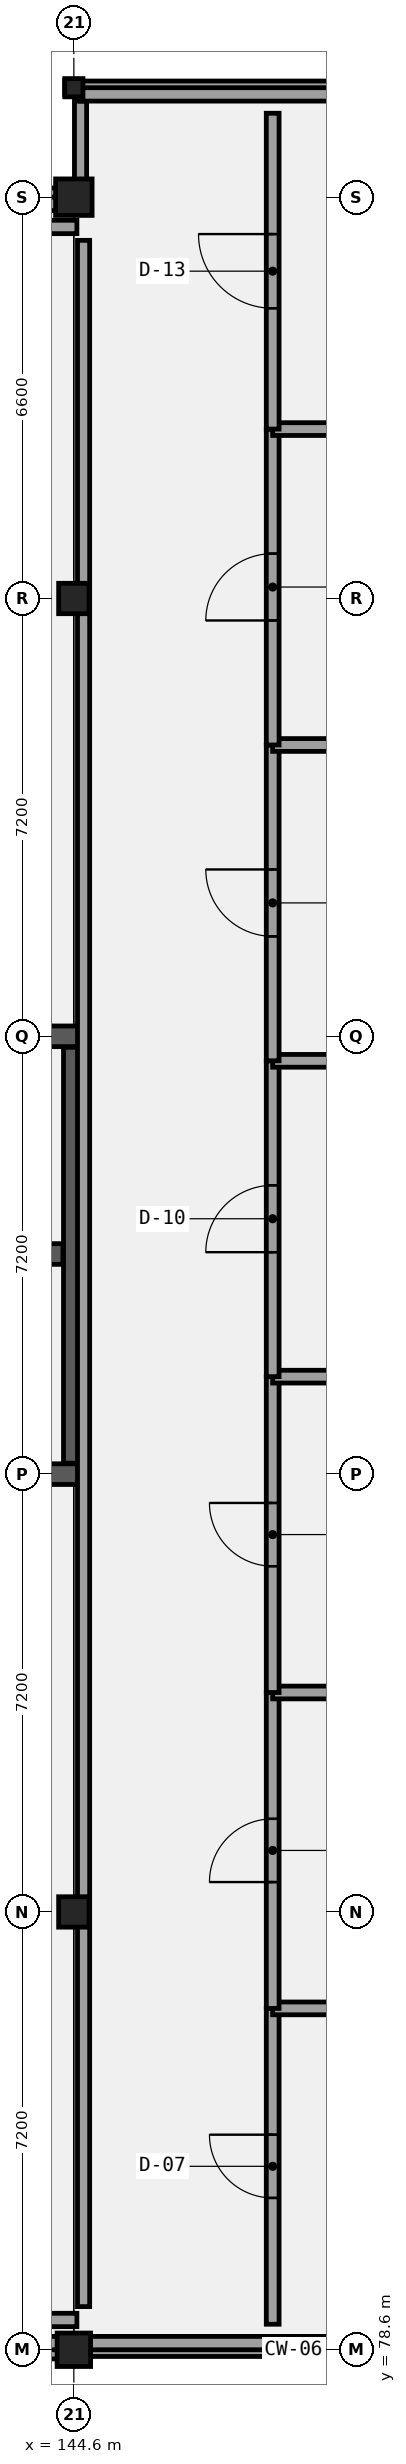
"""IFC4 building model, lengths in metres.
Left out: names, types, materials, properties, quantities, classifications, styles, units other than length and angle.
Written with IfcOpenShell. Run it as: python <this file> out.ifc"""

import sys

from ifc_helpers import new_model, si_unit, direction, frame, frame_2d, origin, origin_2d, place, context, subcontext, project, spatial, rectangle, i_section, extrude, element, fill, save


model = new_model("IFC4")
c1 = context("Model", 3, precision=1e-05, world=origin(), true_north=direction((0.0, 1.0)))
c2 = subcontext(c1, "Body", "Model", "MODEL_VIEW")
j1 = project(units=[si_unit("LENGTHUNIT", "METRE"), si_unit("PLANEANGLEUNIT", "RADIAN")], contexts=[c1])
p1 = place(None, origin())
s1 = spatial("IfcSite", under=j1, at=p1, CompositionType="ELEMENT")
p2 = place(p1, origin())
s2 = spatial("IfcBuilding", under=s1, at=p2, CompositionType="ELEMENT")
p3 = place(p2, frame((0.0, 0.0, 30.9)))
s3 = spatial("IfcBuildingStorey", under=s2, at=p3, CompositionType="ELEMENT", Elevation=30.9)
p4 = place(p3, frame((130.03, 100.2, 0.0), z_axis=(0.0, 0.0, 1.0), x_axis=(1.0, 0.0, 0.0)))
e1 = element("IfcWall", 1, at=p4, inside=s3, PredefinedType="SHEAR", context=c2, shape_type="SweptSolid", body=[
    extrude(rectangle(XDim=14.74, YDim=0.34, at=frame_2d((7.37, 0.0))), origin(), (0.0, 0.0, 1.0), 4.5),
])
p5 = place(p3, frame((130.03, 93.0, 0.0), z_axis=(0.0, 0.0, 1.0), x_axis=(1.0, 0.0, 0.0)))
e2 = element("IfcWall", 2, at=p5, inside=s3, PredefinedType="SHEAR", context=c2, shape_type="SweptSolid", body=[
    extrude(rectangle(XDim=14.74, YDim=0.34, at=frame_2d((7.37, 0.0))), origin(), (0.0, 0.0, 1.0), 4.5),
])
p6 = place(p5, frame((3.72, 0.0, 0.0)))
e3 = element("IfcOpeningElement", 3, at=p6, cuts=e2, PredefinedType="OPENING", context=c2, shape_type="SweptSolid", body=[
    extrude(rectangle(XDim=1.3, YDim=2.2, at=frame_2d((0.65, 1.1))), frame((0.0, 0.18, 0.0), z_axis=(0.0, -1.0, 0.0), x_axis=(1.0, 0.0, 0.0)), (0.0, 0.0, 1.0), 0.36),
])
p7 = place(p5, frame((11.72, 0.0, 0.0)))
e4 = element("IfcOpeningElement", 4, at=p7, cuts=e2, PredefinedType="OPENING", context=c2, shape_type="SweptSolid", body=[
    extrude(rectangle(XDim=1.3, YDim=2.2, at=frame_2d((0.65, 1.1))), frame((0.0, 0.18, 0.0), z_axis=(0.0, -1.0, 0.0), x_axis=(1.0, 0.0, 0.0)), (0.0, 0.0, 1.0), 0.36),
])
p8 = place(p3, frame((144.6, 93.18, 0.0), z_axis=(0.0, 0.0, 1.0), x_axis=(0.0, 1.0, 0.0)))
e5 = element("IfcWall", 5, at=p8, inside=s3, PredefinedType="SHEAR", context=c2, shape_type="SweptSolid", body=[
    extrude(rectangle(XDim=6.84, YDim=0.34, at=frame_2d((3.42, 0.0))), origin(), (0.0, 0.0, 1.0), 4.5),
])
p9 = place(p3, frame((130.38, 96.62, 0.0), z_axis=(0.0, 0.0, 1.0), x_axis=(1.0, 0.0, 0.0)))
e6 = element("IfcWall", 6, at=p9, inside=s3, PredefinedType="SHEAR", context=c2, shape_type="SweptSolid", body=[
    extrude(rectangle(XDim=14.04, YDim=0.34, at=frame_2d((7.02, 0.0))), origin(), (0.0, 0.0, 1.0), 4.5),
])
p10 = place(p9, frame((8.21, 0.0, 0.0)))
e7 = element("IfcOpeningElement", 7, at=p10, cuts=e6, PredefinedType="OPENING", context=c2, shape_type="SweptSolid", body=[
    extrude(rectangle(XDim=1.1, YDim=2.15, at=frame_2d((0.55, 1.075))), frame((0.0, 0.18, 0.0), z_axis=(0.0, -1.0, 0.0), x_axis=(1.0, 0.0, 0.0)), (0.0, 0.0, 1.0), 0.36),
])
p11 = place(p9, frame((10.13, 0.0, 0.0)))
e8 = element("IfcOpeningElement", 8, at=p11, cuts=e6, PredefinedType="OPENING", context=c2, shape_type="SweptSolid", body=[
    extrude(rectangle(XDim=1.1, YDim=2.15, at=frame_2d((0.55, 1.075))), frame((0.0, 0.18, 0.0), z_axis=(0.0, -1.0, 0.0), x_axis=(1.0, 0.0, 0.0)), (0.0, 0.0, 1.0), 0.36),
])
p12 = place(p9, frame((12.05, 0.0, 0.0)))
e9 = element("IfcOpeningElement", 9, at=p12, cuts=e6, PredefinedType="OPENING", context=c2, shape_type="SweptSolid", body=[
    extrude(rectangle(XDim=1.1, YDim=2.15, at=frame_2d((0.55, 1.075))), frame((0.0, 0.18, 0.0), z_axis=(0.0, -1.0, 0.0), x_axis=(1.0, 0.0, 0.0)), (0.0, 0.0, 1.0), 0.36),
])
p13 = place(p9, frame((0.395, 0.0, 0.0)))
e10 = element("IfcOpeningElement", 10, at=p13, cuts=e6, PredefinedType="OPENING", context=c2, shape_type="SweptSolid", body=[
    extrude(rectangle(XDim=1.15, YDim=2.15, at=frame_2d((0.575, 1.075))), frame((0.0, 0.18, 0.0), z_axis=(0.0, -1.0, 0.0), x_axis=(1.0, 0.0, 0.0)), (0.0, 0.0, 1.0), 0.36),
])
p14 = place(p3, frame((144.6, 78.6, 0.0), z_axis=(0.0, 0.0, 1.0), x_axis=(1.0, 0.0, 0.0)))
e11 = element("IfcColumn", 11, at=p14, inside=s3, PredefinedType="COLUMN", context=c2, shape_type="SweptSolid", body=[
    extrude(rectangle(XDim=0.55, YDim=0.55, at=origin_2d()), origin(), (0.0, 0.0, 1.0), 4.5),
])
for number, where, z_axis, x_axis in (
    (12, (144.6, 85.8, 0.0), (0.0, 0.0, 1.0), (1.0, 0.0, 0.0)),
    (13, (144.6, 107.4, 0.0), (0.0, 0.0, 1.0), (1.0, 0.0, 0.0)),
):
    element("IfcColumn", number, at=place(p3, frame(where, z_axis=z_axis, x_axis=x_axis)), inside=s3, PredefinedType="COLUMN", context=c2, shape_type="SweptSolid", body=[
        extrude(rectangle(XDim=0.5, YDim=0.5, at=origin_2d()), origin(), (0.0, 0.0, 1.0), 4.5),
    ])
p15 = place(p3, frame((144.6, 114.0, 0.0), z_axis=(0.0, 0.0, 1.0), x_axis=(1.0, 0.0, 0.0)))
e14 = element("IfcColumn", 14, at=p15, inside=s3, PredefinedType="COLUMN", context=c2, shape_type="SweptSolid", body=[
    extrude(rectangle(XDim=0.6, YDim=0.6, at=origin_2d()), origin(), (0.0, 0.0, 1.0), 4.5),
])
p16 = place(p3, frame((144.6, 115.8, 0.0), z_axis=(0.0, 0.0, 1.0), x_axis=(1.0, 0.0, 0.0)))
e15 = element("IfcColumn", 15, at=p16, inside=s3, PredefinedType="COLUMN", context=c2, shape_type="SweptSolid", body=[
    extrude(i_section(OverallWidth=0.3, OverallDepth=0.3, WebThickness=0.011, FlangeThickness=0.019, FilletRadius=0.027, at=origin_2d()), origin(), (0.0, 0.0, 1.0), 4.5),
])
p17 = place(p3, frame((108.45, 78.6, 0.0), z_axis=(0.0, 0.0, 1.0), x_axis=(1.0, 0.0, 0.0)))
e16 = element("IfcWall", 16, at=p17, inside=s3, PredefinedType="SOLIDWALL", context=c2, shape_type="SweptSolid", body=[
    extrude(rectangle(XDim=36.3, YDim=0.3, at=frame_2d((18.15, 0.0))), origin(), (0.0, 0.0, 1.0), 3.25),
])
p18 = place(p17, frame((17.6, 0.0, 0.0)))
e17 = element("IfcOpeningElement", 17, at=p18, cuts=e16, PredefinedType="OPENING", context=c2, shape_type="SweptSolid", body=[
    extrude(rectangle(XDim=1.1, YDim=2.2, at=frame_2d((0.55, 1.1))), frame((0.0, 0.16, 0.0), z_axis=(0.0, -1.0, 0.0), x_axis=(1.0, 0.0, 0.0)), (0.0, 0.0, 1.0), 0.32),
])
p19 = place(p17, frame((2.275, 0.0, 0.95)))
e18 = element("IfcOpeningElement", 18, at=p19, cuts=e16, PredefinedType="OPENING", context=c2, shape_type="SweptSolid", body=[
    extrude(rectangle(XDim=2.95, YDim=1.9, at=frame_2d((1.475, 0.95))), frame((0.0, 0.16, 0.0), z_axis=(0.0, -1.0, 0.0), x_axis=(1.0, 0.0, 0.0)), (0.0, 0.0, 1.0), 0.32),
])
p20 = place(p17, frame((10.525, 0.0, 0.95)))
e19 = element("IfcOpeningElement", 19, at=p20, cuts=e16, PredefinedType="OPENING", context=c2, shape_type="SweptSolid", body=[
    extrude(rectangle(XDim=0.85, YDim=1.4, at=frame_2d((0.425, 0.7))), frame((0.0, 0.16, 0.0), z_axis=(0.0, -1.0, 0.0), x_axis=(1.0, 0.0, 0.0)), (0.0, 0.0, 1.0), 0.32),
])
p21 = place(p17, frame((24.925, 0.0, 0.95)))
e20 = element("IfcOpeningElement", 20, at=p21, cuts=e16, PredefinedType="OPENING", context=c2, shape_type="SweptSolid", body=[
    extrude(rectangle(XDim=0.85, YDim=1.9, at=frame_2d((0.425, 0.95))), frame((0.0, 0.16, 0.0), z_axis=(0.0, -1.0, 0.0), x_axis=(1.0, 0.0, 0.0)), (0.0, 0.0, 1.0), 0.32),
])
p22 = place(p17, frame((32.05, 0.0, 0.95)))
e21 = element("IfcOpeningElement", 21, at=p22, cuts=e16, PredefinedType="OPENING", context=c2, shape_type="SweptSolid", body=[
    extrude(rectangle(XDim=1.0, YDim=1.4, at=frame_2d((0.5, 0.7))), frame((0.0, 0.16, 0.0), z_axis=(0.0, -1.0, 0.0), x_axis=(1.0, 0.0, 0.0)), (0.0, 0.0, 1.0), 0.32),
])
for number, where, z_axis, x_axis in (
    (22, (144.45, 78.6, 0.0), (0.0, 0.0, 1.0), (1.0, 0.0, 0.0)),
    (23, (168.15, 115.8, 0.0), (0.0, 0.0, 1.0), (-1.0, 0.0, 0.0)),
):
    element("IfcWall", number, at=place(p3, frame(where, z_axis=z_axis, x_axis=x_axis)), inside=s3, PredefinedType="PARAPET", context=c2, shape_type="SweptSolid", body=[
        extrude(rectangle(XDim=23.7, YDim=0.22, at=frame_2d((11.85, 0.0))), origin(), (0.0, 0.0, 1.0), 0.45),
    ])
p23 = place(p3, frame((144.75, 114.0, 0.0), z_axis=(0.0, 0.0, 1.0), x_axis=(-1.0, 0.0, 0.0)))
e24 = element("IfcWall", 24, at=p23, inside=s3, PredefinedType="SOLIDWALL", context=c2, shape_type="SweptSolid", body=[
    extrude(rectangle(XDim=36.3, YDim=0.3, at=frame_2d((18.15, 0.0))), origin(), (0.0, 0.0, 1.0), 3.5),
])
p24 = place(p23, frame((31.45, 0.0, 0.95)))
e25 = element("IfcOpeningElement", 25, at=p24, cuts=e24, PredefinedType="OPENING", context=c2, shape_type="SweptSolid", body=[
    extrude(rectangle(XDim=2.2, YDim=2.15, at=frame_2d((1.1, 1.075))), frame((0.0, 0.16, 0.0), z_axis=(0.0, -1.0, 0.0), x_axis=(1.0, 0.0, 0.0)), (0.0, 0.0, 1.0), 0.32),
])
p25 = place(p23, frame((24.125, 0.0, 0.95)))
e26 = element("IfcOpeningElement", 26, at=p25, cuts=e24, PredefinedType="OPENING", context=c2, shape_type="SweptSolid", body=[
    extrude(rectangle(XDim=2.45, YDim=1.4, at=frame_2d((1.225, 0.7))), frame((0.0, 0.16, 0.0), z_axis=(0.0, -1.0, 0.0), x_axis=(1.0, 0.0, 0.0)), (0.0, 0.0, 1.0), 0.32),
])
p26 = place(p23, frame((16.925, 0.0, 0.95)))
e27 = element("IfcOpeningElement", 27, at=p26, cuts=e24, PredefinedType="OPENING", context=c2, shape_type="SweptSolid", body=[
    extrude(rectangle(XDim=2.45, YDim=1.65, at=frame_2d((1.225, 0.825))), frame((0.0, 0.16, 0.0), z_axis=(0.0, -1.0, 0.0), x_axis=(1.0, 0.0, 0.0)), (0.0, 0.0, 1.0), 0.32),
])
p27 = place(p23, frame((9.725, 0.0, 0.95)))
e28 = element("IfcOpeningElement", 28, at=p27, cuts=e24, PredefinedType="OPENING", context=c2, shape_type="SweptSolid", body=[
    extrude(rectangle(XDim=2.45, YDim=1.9, at=frame_2d((1.225, 0.95))), frame((0.0, 0.16, 0.0), z_axis=(0.0, -1.0, 0.0), x_axis=(1.0, 0.0, 0.0)), (0.0, 0.0, 1.0), 0.32),
])
p28 = place(p23, frame((2.525, 0.0, 0.95)))
e29 = element("IfcOpeningElement", 29, at=p28, cuts=e24, PredefinedType="OPENING", context=c2, shape_type="SweptSolid", body=[
    extrude(rectangle(XDim=2.45, YDim=2.15, at=frame_2d((1.225, 1.075))), frame((0.0, 0.16, 0.0), z_axis=(0.0, -1.0, 0.0), x_axis=(1.0, 0.0, 0.0)), (0.0, 0.0, 1.0), 0.32),
])
p29 = place(p3, frame((108.71, 79.09, 4.5), z_axis=(0.0, 0.0, 1.0), x_axis=(1.0, 0.0, 0.0)))
e30 = element("IfcWall", 30, at=p29, inside=s3, PredefinedType="PARAPET", context=c2, shape_type="SweptSolid", body=[
    extrude(rectangle(XDim=35.94, YDim=0.22, at=frame_2d((17.97, 0.0))), origin(), (0.0, 0.0, 1.0), 1.12),
])
p30 = place(p3, frame((144.76, 79.31, 4.5), z_axis=(0.0, 0.0, 1.0), x_axis=(0.0, 1.0, 0.0)))
e31 = element("IfcWall", 31, at=p30, inside=s3, PredefinedType="PARAPET", context=c2, shape_type="SweptSolid", body=[
    extrude(rectangle(XDim=33.98, YDim=0.2, at=frame_2d((16.99, 0.0))), origin(), (0.0, 0.0, 1.0), 1.12),
])
p31 = place(p3, frame((144.65, 113.51, 4.5), z_axis=(0.0, 0.0, 1.0), x_axis=(-1.0, 0.0, 0.0)))
e32 = element("IfcWall", 32, at=p31, inside=s3, PredefinedType="PARAPET", context=c2, shape_type="SweptSolid", body=[
    extrude(rectangle(XDim=35.94, YDim=0.22, at=frame_2d((17.97, 0.0))), origin(), (0.0, 0.0, 1.0), 1.12),
])
p32 = place(p3, frame((108.71, 113.89, 4.5), z_axis=(0.0, 0.0, 1.0), x_axis=(1.0, 0.0, 0.0)))
e33 = element("IfcWall", 33, at=p32, inside=s3, PredefinedType="PARAPET", context=c2, shape_type="SweptSolid", body=[
    extrude(rectangle(XDim=35.89, YDim=0.22, at=frame_2d((17.945, 0.0))), origin(), (0.0, 0.0, 1.0), 1.12),
])
p33 = place(p3, frame((144.71, 114.11, 4.5), z_axis=(0.0, 0.0, 1.0), x_axis=(0.0, 1.0, 0.0)))
e34 = element("IfcWall", 34, at=p33, inside=s3, PredefinedType="PARAPET", context=c2, shape_type="SweptSolid", body=[
    extrude(rectangle(XDim=1.47, YDim=0.2, at=frame_2d((0.735, 0.0))), origin(), (0.0, 0.0, 1.0), 1.12),
])
p34 = place(p3, frame((144.71, 115.69, 4.5), z_axis=(0.0, 0.0, 1.0), x_axis=(1.0, 0.0, 0.0)))
e35 = element("IfcWall", 35, at=p34, inside=s3, PredefinedType="PARAPET", context=c2, shape_type="SweptSolid", body=[
    extrude(rectangle(XDim=23.18, YDim=0.22, at=frame_2d((11.59, 0.0))), origin(), (0.0, 0.0, 1.0), 1.12),
])
p35 = place(p3, frame((167.89, 78.71, 4.5), z_axis=(0.0, 0.0, 1.0), x_axis=(-1.0, 0.0, 0.0)))
e36 = element("IfcWall", 36, at=p35, inside=s3, PredefinedType="PARAPET", context=c2, shape_type="SweptSolid", body=[
    extrude(rectangle(XDim=59.18, YDim=0.22, at=frame_2d((29.59, 0.0))), origin(), (0.0, 0.0, 1.0), 1.12),
])
p36 = place(p3, frame((147.87, 79.02, 0.0), z_axis=(0.0, 0.0, 1.0), x_axis=(0.0, 1.0, 0.0)))
e37 = element("IfcWall", 37, at=p36, inside=s3, PredefinedType="PARTITIONING", context=c2, shape_type="SweptSolid", body=[
    extrude(rectangle(XDim=5.194, YDim=0.21, at=frame_2d((2.597, 0.0))), origin(), (0.0, 0.0, 1.0), 4.25),
])
p37 = place(p36, frame((2.077, 0.0, 0.0)))
e38 = element("IfcOpeningElement", 38, at=p37, cuts=e37, PredefinedType="OPENING", context=c2, shape_type="SweptSolid", body=[
    extrude(rectangle(XDim=1.04, YDim=2.1, at=frame_2d((0.52, 1.05))), frame((0.0, 0.115, 0.0), z_axis=(0.0, -1.0, 0.0), x_axis=(1.0, 0.0, 0.0)), (0.0, 0.0, 1.0), 0.23),
])
p38 = place(p3, frame((147.87, 84.214, 0.0), z_axis=(0.0, 0.0, 1.0), x_axis=(1.0, 0.0, 0.0)))
e39 = element("IfcWall", 39, at=p38, inside=s3, PredefinedType="PARTITIONING", context=c2, shape_type="SweptSolid", body=[
    extrude(rectangle(XDim=3.38, YDim=0.21, at=frame_2d((1.69, 0.0))), origin(), (0.0, 0.0, 1.0), 4.25),
])
p39 = place(p3, frame((147.87, 84.214, 0.0), z_axis=(0.0, 0.0, 1.0), x_axis=(0.0, 1.0, 0.0)))
e40 = element("IfcWall", 40, at=p39, inside=s3, PredefinedType="PARTITIONING", context=c2, shape_type="SweptSolid", body=[
    extrude(rectangle(XDim=5.195, YDim=0.21, at=frame_2d((2.597, 0.0))), origin(), (0.0, 0.0, 1.0), 4.25),
])
p40 = place(p39, frame((2.077, 0.0, 0.0)))
e41 = element("IfcOpeningElement", 41, at=p40, cuts=e40, PredefinedType="OPENING", context=c2, shape_type="SweptSolid", body=[
    extrude(rectangle(XDim=1.04, YDim=2.22, at=frame_2d((0.52, 1.11))), frame((0.0, 0.115, 0.0), z_axis=(0.0, -1.0, 0.0), x_axis=(1.0, 0.0, 0.0)), (0.0, 0.0, 1.0), 0.23),
])
p41 = place(p3, frame((147.87, 89.409, 0.0), z_axis=(0.0, 0.0, 1.0), x_axis=(1.0, 0.0, 0.0)))
e42 = element("IfcWall", 42, at=p41, inside=s3, PredefinedType="PARTITIONING", context=c2, shape_type="SweptSolid", body=[
    extrude(rectangle(XDim=3.38, YDim=0.21, at=frame_2d((1.69, 0.0))), origin(), (0.0, 0.0, 1.0), 4.25),
])
p42 = place(p3, frame((147.87, 89.409, 0.0), z_axis=(0.0, 0.0, 1.0), x_axis=(0.0, 1.0, 0.0)))
e43 = element("IfcWall", 43, at=p42, inside=s3, PredefinedType="PARTITIONING", context=c2, shape_type="SweptSolid", body=[
    extrude(rectangle(XDim=5.194, YDim=0.21, at=frame_2d((2.597, 0.0))), origin(), (0.0, 0.0, 1.0), 4.25),
])
p43 = place(p42, frame((2.077, 0.0, 0.0)))
e44 = element("IfcOpeningElement", 44, at=p43, cuts=e43, PredefinedType="OPENING", context=c2, shape_type="SweptSolid", body=[
    extrude(rectangle(XDim=1.04, YDim=2.35, at=frame_2d((0.52, 1.175))), frame((0.0, 0.115, 0.0), z_axis=(0.0, -1.0, 0.0), x_axis=(1.0, 0.0, 0.0)), (0.0, 0.0, 1.0), 0.23),
])
p44 = place(p3, frame((147.87, 94.603, 0.0), z_axis=(0.0, 0.0, 1.0), x_axis=(1.0, 0.0, 0.0)))
e45 = element("IfcWall", 45, at=p44, inside=s3, PredefinedType="PARTITIONING", context=c2, shape_type="SweptSolid", body=[
    extrude(rectangle(XDim=3.38, YDim=0.21, at=frame_2d((1.69, 0.0))), origin(), (0.0, 0.0, 1.0), 4.25),
])
p45 = place(p3, frame((147.87, 94.603, 0.0), z_axis=(0.0, 0.0, 1.0), x_axis=(0.0, 1.0, 0.0)))
e46 = element("IfcWall", 46, at=p45, inside=s3, PredefinedType="PARTITIONING", context=c2, shape_type="SweptSolid", body=[
    extrude(rectangle(XDim=5.194, YDim=0.21, at=frame_2d((2.597, 0.0))), origin(), (0.0, 0.0, 1.0), 4.25),
])
p46 = place(p45, frame((2.047, 0.0, 0.0)))
e47 = element("IfcOpeningElement", 47, at=p46, cuts=e46, PredefinedType="OPENING", context=c2, shape_type="SweptSolid", body=[
    extrude(rectangle(XDim=1.1, YDim=2.1, at=frame_2d((0.55, 1.05))), frame((0.0, 0.115, 0.0), z_axis=(0.0, -1.0, 0.0), x_axis=(1.0, 0.0, 0.0)), (0.0, 0.0, 1.0), 0.23),
])
p47 = place(p3, frame((147.87, 99.797, 0.0), z_axis=(0.0, 0.0, 1.0), x_axis=(1.0, 0.0, 0.0)))
e48 = element("IfcWall", 48, at=p47, inside=s3, PredefinedType="PARTITIONING", context=c2, shape_type="SweptSolid", body=[
    extrude(rectangle(XDim=3.38, YDim=0.21, at=frame_2d((1.69, 0.0))), origin(), (0.0, 0.0, 1.0), 4.25),
])
p48 = place(p3, frame((147.87, 99.797, 0.0), z_axis=(0.0, 0.0, 1.0), x_axis=(0.0, 1.0, 0.0)))
e49 = element("IfcWall", 49, at=p48, inside=s3, PredefinedType="PARTITIONING", context=c2, shape_type="SweptSolid", body=[
    extrude(rectangle(XDim=5.194, YDim=0.21, at=frame_2d((2.597, 0.0))), origin(), (0.0, 0.0, 1.0), 4.25),
])
p49 = place(p48, frame((2.047, 0.0, 0.0)))
e50 = element("IfcOpeningElement", 50, at=p49, cuts=e49, PredefinedType="OPENING", context=c2, shape_type="SweptSolid", body=[
    extrude(rectangle(XDim=1.1, YDim=2.22, at=frame_2d((0.55, 1.11))), frame((0.0, 0.115, 0.0), z_axis=(0.0, -1.0, 0.0), x_axis=(1.0, 0.0, 0.0)), (0.0, 0.0, 1.0), 0.23),
])
p50 = place(p3, frame((147.87, 104.991, 0.0), z_axis=(0.0, 0.0, 1.0), x_axis=(1.0, 0.0, 0.0)))
e51 = element("IfcWall", 51, at=p50, inside=s3, PredefinedType="PARTITIONING", context=c2, shape_type="SweptSolid", body=[
    extrude(rectangle(XDim=3.38, YDim=0.21, at=frame_2d((1.69, 0.0))), origin(), (0.0, 0.0, 1.0), 4.25),
])
p51 = place(p3, frame((147.87, 104.991, 0.0), z_axis=(0.0, 0.0, 1.0), x_axis=(0.0, 1.0, 0.0)))
e52 = element("IfcWall", 52, at=p51, inside=s3, PredefinedType="PARTITIONING", context=c2, shape_type="SweptSolid", body=[
    extrude(rectangle(XDim=5.195, YDim=0.21, at=frame_2d((2.598, 0.0))), origin(), (0.0, 0.0, 1.0), 4.25),
])
p52 = place(p51, frame((2.048, 0.0, 0.0)))
e53 = element("IfcOpeningElement", 53, at=p52, cuts=e52, PredefinedType="OPENING", context=c2, shape_type="SweptSolid", body=[
    extrude(rectangle(XDim=1.1, YDim=2.35, at=frame_2d((0.55, 1.175))), frame((0.0, 0.115, 0.0), z_axis=(0.0, -1.0, 0.0), x_axis=(1.0, 0.0, 0.0)), (0.0, 0.0, 1.0), 0.23),
])
p53 = place(p3, frame((147.87, 110.186, 0.0), z_axis=(0.0, 0.0, 1.0), x_axis=(1.0, 0.0, 0.0)))
e54 = element("IfcWall", 54, at=p53, inside=s3, PredefinedType="PARTITIONING", context=c2, shape_type="SweptSolid", body=[
    extrude(rectangle(XDim=3.38, YDim=0.21, at=frame_2d((1.69, 0.0))), origin(), (0.0, 0.0, 1.0), 4.25),
])
p54 = place(p3, frame((147.87, 110.186, 0.0), z_axis=(0.0, 0.0, 1.0), x_axis=(0.0, 1.0, 0.0)))
e55 = element("IfcWall", 55, at=p54, inside=s3, PredefinedType="PARTITIONING", context=c2, shape_type="SweptSolid", body=[
    extrude(rectangle(XDim=5.194, YDim=0.21, at=frame_2d((2.597, 0.0))), origin(), (0.0, 0.0, 1.0), 4.25),
])
p55 = place(p54, frame((1.987, 0.0, 0.0)))
e56 = element("IfcOpeningElement", 56, at=p55, cuts=e55, PredefinedType="OPENING", context=c2, shape_type="SweptSolid", body=[
    extrude(rectangle(XDim=1.22, YDim=2.1, at=frame_2d((0.61, 1.05))), frame((0.0, 0.115, 0.0), z_axis=(0.0, -1.0, 0.0), x_axis=(1.0, 0.0, 0.0)), (0.0, 0.0, 1.0), 0.23),
])
p56 = place(p37, origin())
e57 = element("IfcDoor", 57, at=p56, inside=s3, OperationType="SINGLE_SWING_RIGHT", PredefinedType="DOOR", context=c2, shape_type="SweptSolid", body=[
    extrude(rectangle(XDim=1.04, YDim=2.1, at=frame_2d((0.52, 1.05))), frame((0.0, 0.025, 0.0), z_axis=(0.0, -1.0, 0.0), x_axis=(1.0, 0.0, 0.0)), (0.0, 0.0, 1.0), 0.05),
])
fill(e38, e57)
p57 = place(p40, origin())
e58 = element("IfcDoor", 58, at=p57, inside=s3, OperationType="SINGLE_SWING_LEFT", PredefinedType="DOOR", context=c2, shape_type="SweptSolid", body=[
    extrude(rectangle(XDim=1.04, YDim=2.22, at=frame_2d((0.52, 1.11))), frame((0.0, 0.025, 0.0), z_axis=(0.0, -1.0, 0.0), x_axis=(1.0, 0.0, 0.0)), (0.0, 0.0, 1.0), 0.05),
])
fill(e41, e58)
p58 = place(p43, origin())
e59 = element("IfcDoor", 59, at=p58, inside=s3, OperationType="SINGLE_SWING_RIGHT", PredefinedType="DOOR", context=c2, shape_type="SweptSolid", body=[
    extrude(rectangle(XDim=1.04, YDim=2.35, at=frame_2d((0.52, 1.175))), frame((0.0, 0.025, 0.0), z_axis=(0.0, -1.0, 0.0), x_axis=(1.0, 0.0, 0.0)), (0.0, 0.0, 1.0), 0.05),
])
fill(e44, e59)
p59 = place(p46, origin())
e60 = element("IfcDoor", 60, at=p59, inside=s3, OperationType="SINGLE_SWING_LEFT", PredefinedType="DOOR", context=c2, shape_type="SweptSolid", body=[
    extrude(rectangle(XDim=1.1, YDim=2.1, at=frame_2d((0.55, 1.05))), frame((0.0, 0.025, 0.0), z_axis=(0.0, -1.0, 0.0), x_axis=(1.0, 0.0, 0.0)), (0.0, 0.0, 1.0), 0.05),
])
fill(e47, e60)
p60 = place(p49, origin())
e61 = element("IfcDoor", 61, at=p60, inside=s3, OperationType="SINGLE_SWING_RIGHT", PredefinedType="DOOR", context=c2, shape_type="SweptSolid", body=[
    extrude(rectangle(XDim=1.1, YDim=2.22, at=frame_2d((0.55, 1.11))), frame((0.0, 0.025, 0.0), z_axis=(0.0, -1.0, 0.0), x_axis=(1.0, 0.0, 0.0)), (0.0, 0.0, 1.0), 0.05),
])
fill(e50, e61)
p61 = place(p52, origin())
e62 = element("IfcDoor", 62, at=p61, inside=s3, OperationType="SINGLE_SWING_LEFT", PredefinedType="DOOR", context=c2, shape_type="SweptSolid", body=[
    extrude(rectangle(XDim=1.1, YDim=2.35, at=frame_2d((0.55, 1.175))), frame((0.0, 0.025, 0.0), z_axis=(0.0, -1.0, 0.0), x_axis=(1.0, 0.0, 0.0)), (0.0, 0.0, 1.0), 0.05),
])
fill(e53, e62)
p62 = place(p55, origin())
e63 = element("IfcDoor", 63, at=p62, inside=s3, OperationType="SINGLE_SWING_RIGHT", PredefinedType="DOOR", context=c2, shape_type="SweptSolid", body=[
    extrude(rectangle(XDim=1.22, YDim=2.1, at=frame_2d((0.61, 1.05))), frame((0.0, 0.025, 0.0), z_axis=(0.0, -1.0, 0.0), x_axis=(1.0, 0.0, 0.0)), (0.0, 0.0, 1.0), 0.05),
])
fill(e56, e63)
save(model, sys.argv[1])
